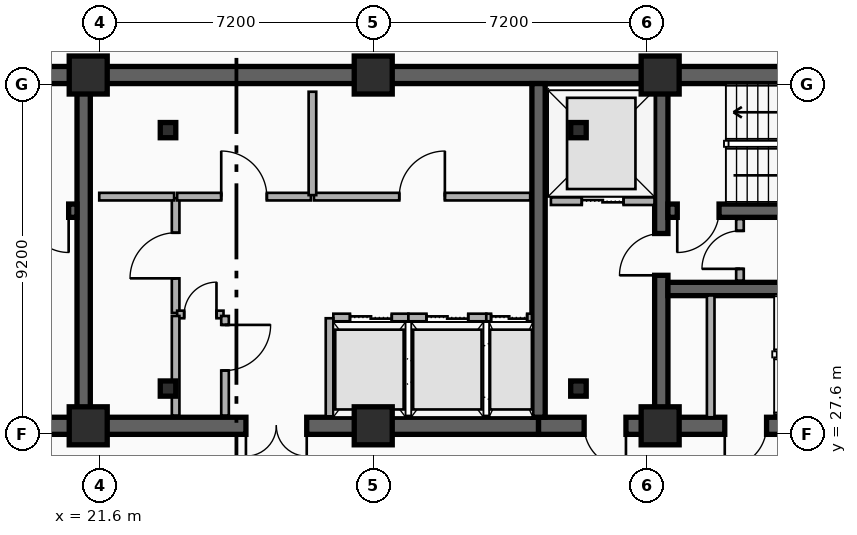
"""IFC4 building model, lengths in metres.
Left out: names, types, materials, properties, quantities, classifications, styles, units other than length and angle.
Written with IfcOpenShell. Run it as: python <this file> out.ifc"""

import sys

from ifc_helpers import new_model, si_unit, direction, frame, frame_2d, origin, origin_2d, place, context, subcontext, project, spatial, rectangle, i_section, extrude, element, fill, save


model = new_model("IFC4")
c1 = context("Model", 3, precision=1e-05, world=origin(), true_north=direction((0.0, 1.0)))
c2 = subcontext(c1, "Body", "Model", "MODEL_VIEW")
j1 = project(units=[si_unit("LENGTHUNIT", "METRE"), si_unit("PLANEANGLEUNIT", "RADIAN")], contexts=[c1])
p1 = place(None, origin())
s1 = spatial("IfcSite", under=j1, at=p1, CompositionType="ELEMENT")
p2 = place(p1, origin())
s2 = spatial("IfcBuilding", under=s1, at=p2, CompositionType="ELEMENT")
p3 = place(p2, frame((0.0, 0.0, 218.4)))
s3 = spatial("IfcBuildingStorey", under=s2, at=p3, CompositionType="ELEMENT", Elevation=218.4)
p4 = place(p3, frame((12.15, 37.05, 0.0), z_axis=(0.0, 0.0, 1.0), x_axis=(1.0, 0.0, 0.0)))
e1 = element("IfcWall", 1, at=p4, inside=s3, PredefinedType="SHEAR", context=c2, shape_type="SweptSolid", body=[
    extrude(rectangle(XDim=33.23, YDim=0.45, at=frame_2d((16.615, 0.0))), origin(), (0.0, 0.0, 1.0), 3.6),
])
p5 = place(p3, frame((21.18, 27.82, 0.0), z_axis=(0.0, 0.0, 1.0), x_axis=(-1.0, 0.0, 0.0)))
e2 = element("IfcWall", 2, at=p5, inside=s3, PredefinedType="SHEAR", context=c2, shape_type="SweptSolid", body=[
    extrude(rectangle(XDim=9.03, YDim=0.45, at=frame_2d((4.515, 0.0))), origin(), (0.0, 0.0, 1.0), 3.6),
])
p6 = place(p5, frame((2.68, 0.0, 0.0)))
e3 = element("IfcOpeningElement", 3, at=p6, cuts=e2, PredefinedType="OPENING", context=c2, shape_type="SweptSolid", body=[
    extrude(rectangle(XDim=1.1, YDim=2.15, at=frame_2d((0.55, 1.075))), frame((0.0, 0.235, 0.0), z_axis=(0.0, -1.0, 0.0), x_axis=(1.0, 0.0, 0.0)), (0.0, 0.0, 1.0), 0.47),
])
p7 = place(p3, frame((33.15, 27.82, 0.0), z_axis=(0.0, 0.0, 1.0), x_axis=(-1.0, 0.0, 0.0)))
e4 = element("IfcWall", 4, at=p7, inside=s3, PredefinedType="SHEAR", context=c2, shape_type="SweptSolid", body=[
    extrude(rectangle(XDim=11.97, YDim=0.45, at=frame_2d((5.985, 0.0))), origin(), (0.0, 0.0, 1.0), 3.6),
])
p8 = place(p7, frame((6.1, 0.0, 0.0)))
e5 = element("IfcOpeningElement", 5, at=p8, cuts=e4, PredefinedType="OPENING", context=c2, shape_type="SweptSolid", body=[
    extrude(rectangle(XDim=1.6, YDim=2.2, at=frame_2d((0.8, 1.1))), frame((0.0, 0.235, 0.0), z_axis=(0.0, -1.0, 0.0), x_axis=(1.0, 0.0, 0.0)), (0.0, 0.0, 1.0), 0.47),
])
p9 = place(p3, frame((45.38, 27.82, 0.0), z_axis=(0.0, 0.0, 1.0), x_axis=(-1.0, 0.0, 0.0)))
e6 = element("IfcWall", 6, at=p9, inside=s3, PredefinedType="SHEAR", context=c2, shape_type="SweptSolid", body=[
    extrude(rectangle(XDim=12.23, YDim=0.45, at=frame_2d((6.115, 0.0))), origin(), (0.0, 0.0, 1.0), 3.6),
])
p10 = place(p9, frame((9.93, 0.0, 0.0)))
e7 = element("IfcOpeningElement", 7, at=p10, cuts=e6, PredefinedType="OPENING", context=c2, shape_type="SweptSolid", body=[
    extrude(rectangle(XDim=1.1, YDim=2.15, at=frame_2d((0.55, 1.075))), frame((0.0, 0.235, 0.0), z_axis=(0.0, -1.0, 0.0), x_axis=(1.0, 0.0, 0.0)), (0.0, 0.0, 1.0), 0.47),
])
p11 = place(p9, frame((6.23, 0.0, 0.0)))
e8 = element("IfcOpeningElement", 8, at=p11, cuts=e6, PredefinedType="OPENING", context=c2, shape_type="SweptSolid", body=[
    extrude(rectangle(XDim=1.1, YDim=2.15, at=frame_2d((0.55, 1.075))), frame((0.0, 0.235, 0.0), z_axis=(0.0, -1.0, 0.0), x_axis=(1.0, 0.0, 0.0)), (0.0, 0.0, 1.0), 0.47),
])
for number, where, z_axis, x_axis in (
    (9, (21.18, 28.045, 0.0), (0.0, 0.0, 1.0), (0.0, 1.0, 0.0)),
    (10, (33.15, 28.045, 0.0), (0.0, 0.0, 1.0), (0.0, 1.0, 0.0)),
):
    element("IfcWall", number, at=place(p3, frame(where, z_axis=z_axis, x_axis=x_axis)), inside=s3, PredefinedType="SHEAR", context=c2, shape_type="SweptSolid", body=[
        extrude(rectangle(XDim=8.78, YDim=0.35, at=frame_2d((4.39, 0.0))), origin(), (0.0, 0.0, 1.0), 3.6),
    ])
p12 = place(p3, frame((36.38, 28.045, 0.0), z_axis=(0.0, 0.0, 1.0), x_axis=(0.0, 1.0, 0.0)))
e11 = element("IfcWall", 11, at=p12, inside=s3, PredefinedType="SHEAR", context=c2, shape_type="SweptSolid", body=[
    extrude(rectangle(XDim=8.78, YDim=0.35, at=frame_2d((4.39, 0.0))), origin(), (0.0, 0.0, 1.0), 3.6),
])
p13 = place(p12, frame((3.735, 0.0, 0.0)))
e12 = element("IfcOpeningElement", 12, at=p13, cuts=e11, PredefinedType="OPENING", context=c2, shape_type="SweptSolid", body=[
    extrude(rectangle(XDim=1.1, YDim=2.15, at=frame_2d((0.55, 1.075))), frame((0.0, 0.185, 0.0), z_axis=(0.0, -1.0, 0.0), x_axis=(1.0, 0.0, 0.0)), (0.0, 0.0, 1.0), 0.37),
])
p14 = place(p3, frame((21.005, 33.48, 0.0), z_axis=(0.0, 0.0, 1.0), x_axis=(-1.0, 0.0, 0.0)))
e13 = element("IfcWall", 13, at=p14, inside=s3, PredefinedType="SHEAR", context=c2, shape_type="SweptSolid", body=[
    extrude(rectangle(XDim=8.63, YDim=0.35, at=frame_2d((4.315, 0.0))), origin(), (0.0, 0.0, 1.0), 3.6),
])
p15 = place(p14, frame((0.22, 0.0, 0.0)))
e14 = element("IfcOpeningElement", 14, at=p15, cuts=e13, PredefinedType="OPENING", context=c2, shape_type="SweptSolid", body=[
    extrude(rectangle(XDim=1.1, YDim=2.15, at=frame_2d((0.55, 1.075))), frame((0.0, 0.185, 0.0), z_axis=(0.0, -1.0, 0.0), x_axis=(1.0, 0.0, 0.0)), (0.0, 0.0, 1.0), 0.37),
])
p16 = place(p3, frame((45.155, 33.48, 0.0), z_axis=(0.0, 0.0, 1.0), x_axis=(-1.0, 0.0, 0.0)))
e15 = element("IfcWall", 15, at=p16, inside=s3, PredefinedType="SHEAR", context=c2, shape_type="SweptSolid", body=[
    extrude(rectangle(XDim=8.6, YDim=0.35, at=frame_2d((4.3, 0.0))), origin(), (0.0, 0.0, 1.0), 3.6),
])
p17 = place(p16, frame((7.255, 0.0, 0.0)))
e16 = element("IfcOpeningElement", 16, at=p17, cuts=e15, PredefinedType="OPENING", context=c2, shape_type="SweptSolid", body=[
    extrude(rectangle(XDim=1.1, YDim=2.15, at=frame_2d((0.55, 1.075))), frame((0.0, 0.185, 0.0), z_axis=(0.0, -1.0, 0.0), x_axis=(1.0, 0.0, 0.0)), (0.0, 0.0, 1.0), 0.37),
])
p18 = place(p3, frame((36.555, 31.42, 0.0), z_axis=(0.0, 0.0, 1.0), x_axis=(1.0, 0.0, 0.0)))
e17 = element("IfcWall", 17, at=p18, inside=s3, PredefinedType="SHEAR", context=c2, shape_type="SweptSolid", body=[
    extrude(rectangle(XDim=8.6, YDim=0.35, at=frame_2d((4.3, 0.0))), origin(), (0.0, 0.0, 1.0), 3.6),
])
for number, where, z_axis, x_axis in (
    (18, (23.4, 28.8, 0.0), (0.0, 0.0, 1.0), (1.0, 0.0, 0.0)),
    (19, (34.2, 28.8, 0.0), (0.0, 0.0, 1.0), (1.0, 0.0, 0.0)),
    (20, (34.2, 35.6, 0.0), (0.0, 0.0, 1.0), (1.0, 0.0, 0.0)),
    (21, (23.4, 35.6, 0.0), (0.0, 0.0, 1.0), (1.0, 0.0, 0.0)),
):
    element("IfcColumn", number, at=place(p3, frame(where, z_axis=z_axis, x_axis=x_axis)), inside=s3, PredefinedType="COLUMN", context=c2, shape_type="SweptSolid", body=[
        extrude(i_section(OverallWidth=0.408, OverallDepth=0.4, WebThickness=0.025, FlangeThickness=0.039, FilletRadius=0.015, at=origin_2d()), origin(), (0.0, 0.0, 1.0), 3.6),
    ])
for number, where, z_axis, x_axis in (
    (22, (21.3, 27.82, 0.0), (0.0, 0.0, 1.0), (1.0, 0.0, 0.0)),
    (23, (21.3, 37.05, 0.0), (0.0, 0.0, 1.0), (1.0, 0.0, 0.0)),
    (24, (28.8, 27.82, 0.0), (0.0, 0.0, 1.0), (1.0, 0.0, 0.0)),
    (25, (28.8, 37.05, 0.0), (0.0, 0.0, 1.0), (1.0, 0.0, 0.0)),
    (26, (36.35, 27.82, 0.0), (0.0, 0.0, 1.0), (1.0, 0.0, 0.0)),
    (27, (36.35, 37.05, 0.0), (0.0, 0.0, 1.0), (1.0, 0.0, 0.0)),
):
    element("IfcColumn", number, at=place(p3, frame(where, z_axis=z_axis, x_axis=x_axis)), inside=s3, PredefinedType="COLUMN", context=c2, shape_type="SweptSolid", body=[
        extrude(rectangle(XDim=1.0, YDim=1.0, at=origin_2d()), origin(), (0.0, 0.0, 1.0), 3.6),
    ])
p19 = place(p3, frame((33.475, 33.73, 0.0), z_axis=(0.0, 0.0, 1.0), x_axis=(1.0, 0.0, 0.0)))
e28 = element("IfcWall", 28, at=p19, inside=s3, PredefinedType="PARTITIONING", context=c2, shape_type="SweptSolid", body=[
    extrude(rectangle(XDim=2.725, YDim=0.2, at=frame_2d((1.362, 0.0))), origin(), (0.0, 0.0, 1.0), 2.41),
])
p20 = place(p19, frame((0.812, 0.0, 0.0)))
e29 = element("IfcOpeningElement", 29, at=p20, cuts=e28, PredefinedType="OPENING", context=c2, shape_type="SweptSolid", body=[
    extrude(rectangle(XDim=1.1, YDim=2.15, at=frame_2d((0.55, 1.075))), frame((0.0, 0.11, 0.0), z_axis=(0.0, -1.0, 0.0), x_axis=(1.0, 0.0, 0.0)), (0.0, 0.0, 1.0), 0.22),
])
p21 = place(p3, frame((27.75, 30.67, 0.0), z_axis=(0.0, 0.0, 1.0), x_axis=(1.0, 0.0, 0.0)))
e30 = element("IfcWall", 30, at=p21, inside=s3, PredefinedType="PARTITIONING", context=c2, shape_type="SweptSolid", body=[
    extrude(rectangle(XDim=1.975, YDim=0.2, at=frame_2d((0.988, 0.0))), origin(), (0.0, 0.0, 1.0), 2.41),
])
p22 = place(p21, frame((0.438, 0.0, 0.0)))
e31 = element("IfcOpeningElement", 31, at=p22, cuts=e30, PredefinedType="OPENING", context=c2, shape_type="SweptSolid", body=[
    extrude(rectangle(XDim=1.1, YDim=2.15, at=frame_2d((0.55, 1.075))), frame((0.0, 0.11, 0.0), z_axis=(0.0, -1.0, 0.0), x_axis=(1.0, 0.0, 0.0)), (0.0, 0.0, 1.0), 0.22),
])
p23 = place(p3, frame((27.65, 28.07, 0.0), z_axis=(0.0, 0.0, 1.0), x_axis=(0.0, 1.0, 0.0)))
e32 = element("IfcWall", 32, at=p23, inside=s3, PredefinedType="PARTITIONING", context=c2, shape_type="SweptSolid", body=[
    extrude(rectangle(XDim=2.58, YDim=0.2, at=frame_2d((1.29, 0.0))), origin(), (0.0, 0.0, 1.0), 2.41),
])
p24 = place(p3, frame((29.725, 30.67, 0.0), z_axis=(0.0, 0.0, 1.0), x_axis=(1.0, 0.0, 0.0)))
e33 = element("IfcWall", 33, at=p24, inside=s3, PredefinedType="PARTITIONING", context=c2, shape_type="SweptSolid", body=[
    extrude(rectangle(XDim=2.05, YDim=0.2, at=frame_2d((1.025, 0.0))), origin(), (0.0, 0.0, 1.0), 2.72),
])
p25 = place(p24, frame((0.475, 0.0, 0.0)))
e34 = element("IfcOpeningElement", 34, at=p25, cuts=e33, PredefinedType="OPENING", context=c2, shape_type="SweptSolid", body=[
    extrude(rectangle(XDim=1.1, YDim=2.15, at=frame_2d((0.55, 1.075))), frame((0.0, 0.11, 0.0), z_axis=(0.0, -1.0, 0.0), x_axis=(1.0, 0.0, 0.0)), (0.0, 0.0, 1.0), 0.22),
])
p26 = place(p3, frame((31.775, 30.67, 0.0), z_axis=(0.0, 0.0, 1.0), x_axis=(1.0, 0.0, 0.0)))
e35 = element("IfcWall", 35, at=p26, inside=s3, PredefinedType="PARTITIONING", context=c2, shape_type="SweptSolid", body=[
    extrude(rectangle(XDim=1.2, YDim=0.2, at=frame_2d((0.6, 0.0))), origin(), (0.0, 0.0, 1.0), 2.72),
])
p27 = place(p26, frame((0.125, 0.0, 0.0)))
e36 = element("IfcOpeningElement", 36, at=p27, cuts=e35, PredefinedType="OPENING", context=c2, shape_type="SweptSolid", body=[
    extrude(rectangle(XDim=0.95, YDim=2.15, at=frame_2d((0.475, 1.075))), frame((0.0, 0.11, 0.0), z_axis=(0.0, -1.0, 0.0), x_axis=(1.0, 0.0, 0.0)), (0.0, 0.0, 1.0), 0.22),
])
p28 = place(p3, frame((37.68, 28.045, 0.0), z_axis=(0.0, 0.0, 1.0), x_axis=(0.0, 1.0, 0.0)))
e37 = element("IfcWall", 37, at=p28, inside=s3, PredefinedType="PARTITIONING", context=c2, shape_type="SweptSolid", body=[
    extrude(rectangle(XDim=3.205, YDim=0.2, at=frame_2d((1.603, 0.0))), origin(), (0.0, 0.0, 1.0), 2.72),
])
p29 = place(p3, frame((38.45, 31.64, 0.0), z_axis=(0.0, 0.0, 1.0), x_axis=(0.0, 1.0, 0.0)))
e38 = element("IfcWall", 38, at=p29, inside=s3, PredefinedType="PARTITIONING", context=c2, shape_type="SweptSolid", body=[
    extrude(rectangle(XDim=1.62, YDim=0.2, at=frame_2d((0.81, 0.0))), origin(), (0.0, 0.0, 1.0), 3.34),
])
p30 = place(p29, frame((0.31, 0.0, 0.0)))
e39 = element("IfcOpeningElement", 39, at=p30, cuts=e38, PredefinedType="OPENING", context=c2, shape_type="SweptSolid", body=[
    extrude(rectangle(XDim=1.0, YDim=2.15, at=frame_2d((0.5, 1.075))), frame((0.0, 0.11, 0.0), z_axis=(0.0, -1.0, 0.0), x_axis=(1.0, 0.0, 0.0)), (0.0, 0.0, 1.0), 0.22),
])
p31 = place(p3, frame((23.6, 30.79, 0.0), z_axis=(0.0, 0.0, 1.0), x_axis=(0.0, 1.0, 0.0)))
e40 = element("IfcWall", 40, at=p31, inside=s3, PredefinedType="PARTITIONING", context=c2, shape_type="SweptSolid", body=[
    extrude(rectangle(XDim=3.02, YDim=0.2, at=frame_2d((1.51, 0.0))), origin(), (0.0, 0.0, 1.0), 3.34),
])
p32 = place(p31, frame((0.91, 0.0, 0.0)))
e41 = element("IfcOpeningElement", 41, at=p32, cuts=e40, PredefinedType="OPENING", context=c2, shape_type="SweptSolid", body=[
    extrude(rectangle(XDim=1.2, YDim=2.15, at=frame_2d((0.6, 1.075))), frame((0.0, 0.11, 0.0), z_axis=(0.0, -1.0, 0.0), x_axis=(1.0, 0.0, 0.0)), (0.0, 0.0, 1.0), 0.22),
])
p33 = place(p3, frame((23.64, 30.75, 0.0), z_axis=(0.0, 0.0, 1.0), x_axis=(1.0, 0.0, 0.0)))
e42 = element("IfcWall", 42, at=p33, inside=s3, PredefinedType="PARTITIONING", context=c2, shape_type="SweptSolid", body=[
    extrude(rectangle(XDim=1.22, YDim=0.2, at=frame_2d((0.61, 0.0))), origin(), (0.0, 0.0, 1.0), 3.34),
])
p34 = place(p33, frame((0.185, 0.0, 0.0)))
e43 = element("IfcOpeningElement", 43, at=p34, cuts=e42, PredefinedType="OPENING", context=c2, shape_type="SweptSolid", body=[
    extrude(rectangle(XDim=0.85, YDim=2.1, at=frame_2d((0.425, 1.05))), frame((0.0, 0.11, 0.0), z_axis=(0.0, -1.0, 0.0), x_axis=(1.0, 0.0, 0.0)), (0.0, 0.0, 1.0), 0.22),
])
p35 = place(p3, frame((23.64, 33.85, 0.0), z_axis=(0.0, 0.0, 1.0), x_axis=(1.0, 0.0, 0.0)))
e44 = element("IfcWall", 44, at=p35, inside=s3, PredefinedType="PARTITIONING", context=c2, shape_type="SweptSolid", body=[
    extrude(rectangle(XDim=3.52, YDim=0.2, at=frame_2d((1.76, 0.0))), origin(), (0.0, 0.0, 1.0), 3.34),
])
p36 = place(p35, frame((1.16, 0.0, 0.0)))
e45 = element("IfcOpeningElement", 45, at=p36, cuts=e44, PredefinedType="OPENING", context=c2, shape_type="SweptSolid", body=[
    extrude(rectangle(XDim=1.2, YDim=2.15, at=frame_2d((0.6, 1.075))), frame((0.0, 0.11, 0.0), z_axis=(0.0, -1.0, 0.0), x_axis=(1.0, 0.0, 0.0)), (0.0, 0.0, 1.0), 0.22),
])
p37 = place(p3, frame((27.24, 33.85, 0.0), z_axis=(0.0, 0.0, 1.0), x_axis=(1.0, 0.0, 0.0)))
e46 = element("IfcWall", 46, at=p37, inside=s3, PredefinedType="PARTITIONING", context=c2, shape_type="SweptSolid", body=[
    extrude(rectangle(XDim=5.69, YDim=0.2, at=frame_2d((2.845, 0.0))), origin(), (0.0, 0.0, 1.0), 2.41),
])
p38 = place(p37, frame((2.245, 0.0, 0.0)))
e47 = element("IfcOpeningElement", 47, at=p38, cuts=e46, PredefinedType="OPENING", context=c2, shape_type="SweptSolid", body=[
    extrude(rectangle(XDim=1.2, YDim=2.15, at=frame_2d((0.6, 1.075))), frame((0.0, 0.11, 0.0), z_axis=(0.0, -1.0, 0.0), x_axis=(1.0, 0.0, 0.0)), (0.0, 0.0, 1.0), 0.22),
])
p39 = place(p3, frame((24.9, 30.71, 0.0), z_axis=(0.0, 0.0, 1.0), x_axis=(0.0, -1.0, 0.0)))
e48 = element("IfcWall", 48, at=p39, inside=s3, PredefinedType="PARTITIONING", context=c2, shape_type="SweptSolid", body=[
    extrude(rectangle(XDim=2.62, YDim=0.2, at=frame_2d((1.31, 0.0))), origin(), (0.0, 0.0, 1.0), 2.72),
])
p40 = place(p39, frame((0.235, 0.0, 0.0)))
e49 = element("IfcOpeningElement", 49, at=p40, cuts=e48, PredefinedType="OPENING", context=c2, shape_type="SweptSolid", body=[
    extrude(rectangle(XDim=1.2, YDim=2.15, at=frame_2d((0.6, 1.075))), frame((0.0, 0.11, 0.0), z_axis=(0.0, -1.0, 0.0), x_axis=(1.0, 0.0, 0.0)), (0.0, 0.0, 1.0), 0.22),
])
p41 = place(p3, frame((23.6, 28.09, 0.0), z_axis=(0.0, 0.0, 1.0), x_axis=(0.0, 1.0, 0.0)))
e50 = element("IfcWall", 50, at=p41, inside=s3, PredefinedType="PARTITIONING", context=c2, shape_type="SweptSolid", body=[
    extrude(rectangle(XDim=2.62, YDim=0.2, at=frame_2d((1.31, 0.0))), origin(), (0.0, 0.0, 1.0), 2.72),
])
p42 = place(p3, frame((21.59, 33.85, 0.0), z_axis=(0.0, 0.0, 1.0), x_axis=(1.0, 0.0, 0.0)))
e51 = element("IfcWall", 51, at=p42, inside=s3, PredefinedType="PARTITIONING", context=c2, shape_type="SweptSolid", body=[
    extrude(rectangle(XDim=1.97, YDim=0.2, at=frame_2d((0.985, 0.0))), origin(), (0.0, 0.0, 1.0), 2.41),
])
p43 = place(p3, frame((27.2, 33.89, 0.0), z_axis=(0.0, 0.0, 1.0), x_axis=(0.0, 1.0, 0.0)))
e52 = element("IfcWall", 52, at=p43, inside=s3, PredefinedType="PARTITIONING", context=c2, shape_type="SweptSolid", body=[
    extrude(rectangle(XDim=2.72, YDim=0.2, at=frame_2d((1.36, 0.0))), origin(), (0.0, 0.0, 1.0), 3.34),
])
p44 = place(p20, origin())
e53 = element("IfcDoor", 53, at=p44, inside=s3, OperationType="DOUBLE_DOOR_SLIDING", PredefinedType="DOOR", context=c2, shape_type="SweptSolid", body=[
    extrude(rectangle(XDim=1.1, YDim=2.15, at=frame_2d((0.55, 1.075))), frame((0.0, 0.025, 0.0), z_axis=(0.0, -1.0, 0.0), x_axis=(1.0, 0.0, 0.0)), (0.0, 0.0, 1.0), 0.05),
])
fill(e29, e53)
p45 = place(p22, origin())
e54 = element("IfcDoor", 54, at=p45, inside=s3, OperationType="DOUBLE_DOOR_SLIDING", PredefinedType="DOOR", context=c2, shape_type="SweptSolid", body=[
    extrude(rectangle(XDim=1.1, YDim=2.15, at=frame_2d((0.55, 1.075))), frame((0.0, 0.025, 0.0), z_axis=(0.0, -1.0, 0.0), x_axis=(1.0, 0.0, 0.0)), (0.0, 0.0, 1.0), 0.05),
])
fill(e31, e54)
p46 = place(p25, origin())
e55 = element("IfcDoor", 55, at=p46, inside=s3, OperationType="DOUBLE_DOOR_SLIDING", PredefinedType="DOOR", context=c2, shape_type="SweptSolid", body=[
    extrude(rectangle(XDim=1.1, YDim=2.15, at=frame_2d((0.55, 1.075))), frame((0.0, 0.025, 0.0), z_axis=(0.0, -1.0, 0.0), x_axis=(1.0, 0.0, 0.0)), (0.0, 0.0, 1.0), 0.05),
])
fill(e34, e55)
p47 = place(p27, origin())
e56 = element("IfcDoor", 56, at=p47, inside=s3, OperationType="DOUBLE_DOOR_SLIDING", PredefinedType="DOOR", context=c2, shape_type="SweptSolid", body=[
    extrude(rectangle(XDim=0.95, YDim=2.15, at=frame_2d((0.475, 1.075))), frame((0.0, 0.025, 0.0), z_axis=(0.0, -1.0, 0.0), x_axis=(1.0, 0.0, 0.0)), (0.0, 0.0, 1.0), 0.05),
])
fill(e36, e56)
p48 = place(p15, origin())
e57 = element("IfcDoor", 57, at=p48, inside=s3, OperationType="SINGLE_SWING_LEFT", PredefinedType="DOOR", context=c2, shape_type="SweptSolid", body=[
    extrude(rectangle(XDim=1.1, YDim=2.15, at=frame_2d((0.55, 1.075))), frame((0.0, 0.025, 0.0), z_axis=(0.0, -1.0, 0.0), x_axis=(1.0, 0.0, 0.0)), (0.0, 0.0, 1.0), 0.05),
])
fill(e14, e57)
p49 = place(p17, origin())
e58 = element("IfcDoor", 58, at=p49, inside=s3, OperationType="SINGLE_SWING_RIGHT", PredefinedType="DOOR", context=c2, shape_type="SweptSolid", body=[
    extrude(rectangle(XDim=1.1, YDim=2.15, at=frame_2d((0.55, 1.075))), frame((0.0, 0.025, 0.0), z_axis=(0.0, -1.0, 0.0), x_axis=(1.0, 0.0, 0.0)), (0.0, 0.0, 1.0), 0.05),
])
fill(e16, e58)
p50 = place(p13, origin())
e59 = element("IfcDoor", 59, at=p50, inside=s3, OperationType="SINGLE_SWING_LEFT", PredefinedType="DOOR", context=c2, shape_type="SweptSolid", body=[
    extrude(rectangle(XDim=1.1, YDim=2.15, at=frame_2d((0.55, 1.075))), frame((0.0, 0.025, 0.0), z_axis=(0.0, -1.0, 0.0), x_axis=(1.0, 0.0, 0.0)), (0.0, 0.0, 1.0), 0.05),
])
fill(e12, e59)
p51 = place(p10, origin())
e60 = element("IfcDoor", 60, at=p51, inside=s3, OperationType="SINGLE_SWING_LEFT", PredefinedType="DOOR", context=c2, shape_type="SweptSolid", body=[
    extrude(rectangle(XDim=1.1, YDim=2.15, at=frame_2d((0.55, 1.075))), frame((0.0, 0.025, 0.0), z_axis=(0.0, -1.0, 0.0), x_axis=(1.0, 0.0, 0.0)), (0.0, 0.0, 1.0), 0.05),
])
fill(e7, e60)
p52 = place(p11, origin())
e61 = element("IfcDoor", 61, at=p52, inside=s3, OperationType="SINGLE_SWING_RIGHT", PredefinedType="DOOR", context=c2, shape_type="SweptSolid", body=[
    extrude(rectangle(XDim=1.1, YDim=2.15, at=frame_2d((0.55, 1.075))), frame((0.0, 0.025, 0.0), z_axis=(0.0, -1.0, 0.0), x_axis=(1.0, 0.0, 0.0)), (0.0, 0.0, 1.0), 0.05),
])
fill(e8, e61)
p53 = place(p8, origin())
e62 = element("IfcDoor", 62, at=p53, inside=s3, OperationType="SINGLE_SWING_LEFT", PredefinedType="DOOR", context=c2, shape_type="SweptSolid", body=[
    extrude(rectangle(XDim=1.6, YDim=2.2, at=frame_2d((0.8, 1.1))), frame((0.0, 0.025, 0.0), z_axis=(0.0, -1.0, 0.0), x_axis=(1.0, 0.0, 0.0)), (0.0, 0.0, 1.0), 0.05),
])
fill(e5, e62)
p54 = place(p30, origin())
e63 = element("IfcDoor", 63, at=p54, inside=s3, OperationType="SINGLE_SWING_LEFT", PredefinedType="DOOR", context=c2, shape_type="SweptSolid", body=[
    extrude(rectangle(XDim=1.0, YDim=2.15, at=frame_2d((0.5, 1.075))), frame((0.0, 0.025, 0.0), z_axis=(0.0, -1.0, 0.0), x_axis=(1.0, 0.0, 0.0)), (0.0, 0.0, 1.0), 0.05),
])
fill(e39, e63)
p55 = place(p32, origin())
e64 = element("IfcDoor", 64, at=p55, inside=s3, OperationType="SINGLE_SWING_LEFT", PredefinedType="DOOR", context=c2, shape_type="SweptSolid", body=[
    extrude(rectangle(XDim=1.2, YDim=2.15, at=frame_2d((0.6, 1.075))), frame((0.0, 0.025, 0.0), z_axis=(0.0, -1.0, 0.0), x_axis=(1.0, 0.0, 0.0)), (0.0, 0.0, 1.0), 0.05),
])
fill(e41, e64)
p56 = place(p34, origin())
e65 = element("IfcDoor", 65, at=p56, inside=s3, OperationType="SINGLE_SWING_RIGHT", PredefinedType="DOOR", context=c2, shape_type="SweptSolid", body=[
    extrude(rectangle(XDim=0.85, YDim=2.1, at=frame_2d((0.425, 1.05))), frame((0.0, 0.025, 0.0), z_axis=(0.0, -1.0, 0.0), x_axis=(1.0, 0.0, 0.0)), (0.0, 0.0, 1.0), 0.05),
])
fill(e43, e65)
p57 = place(p36, origin())
e66 = element("IfcDoor", 66, at=p57, inside=s3, OperationType="SINGLE_SWING_LEFT", PredefinedType="DOOR", context=c2, shape_type="SweptSolid", body=[
    extrude(rectangle(XDim=1.2, YDim=2.15, at=frame_2d((0.6, 1.075))), frame((0.0, 0.025, 0.0), z_axis=(0.0, -1.0, 0.0), x_axis=(1.0, 0.0, 0.0)), (0.0, 0.0, 1.0), 0.05),
])
fill(e45, e66)
p58 = place(p38, origin())
e67 = element("IfcDoor", 67, at=p58, inside=s3, OperationType="SINGLE_SWING_RIGHT", PredefinedType="DOOR", context=c2, shape_type="SweptSolid", body=[
    extrude(rectangle(XDim=1.2, YDim=2.15, at=frame_2d((0.6, 1.075))), frame((0.0, 0.025, 0.0), z_axis=(0.0, -1.0, 0.0), x_axis=(1.0, 0.0, 0.0)), (0.0, 0.0, 1.0), 0.05),
])
fill(e47, e67)
p59 = place(p40, origin())
e68 = element("IfcDoor", 68, at=p59, inside=s3, OperationType="SINGLE_SWING_LEFT", PredefinedType="DOOR", context=c2, shape_type="SweptSolid", body=[
    extrude(rectangle(XDim=1.2, YDim=2.15, at=frame_2d((0.6, 1.075))), frame((0.0, 0.025, 0.0), z_axis=(0.0, -1.0, 0.0), x_axis=(1.0, 0.0, 0.0)), (0.0, 0.0, 1.0), 0.05),
])
fill(e49, e68)
save(model, sys.argv[1])
